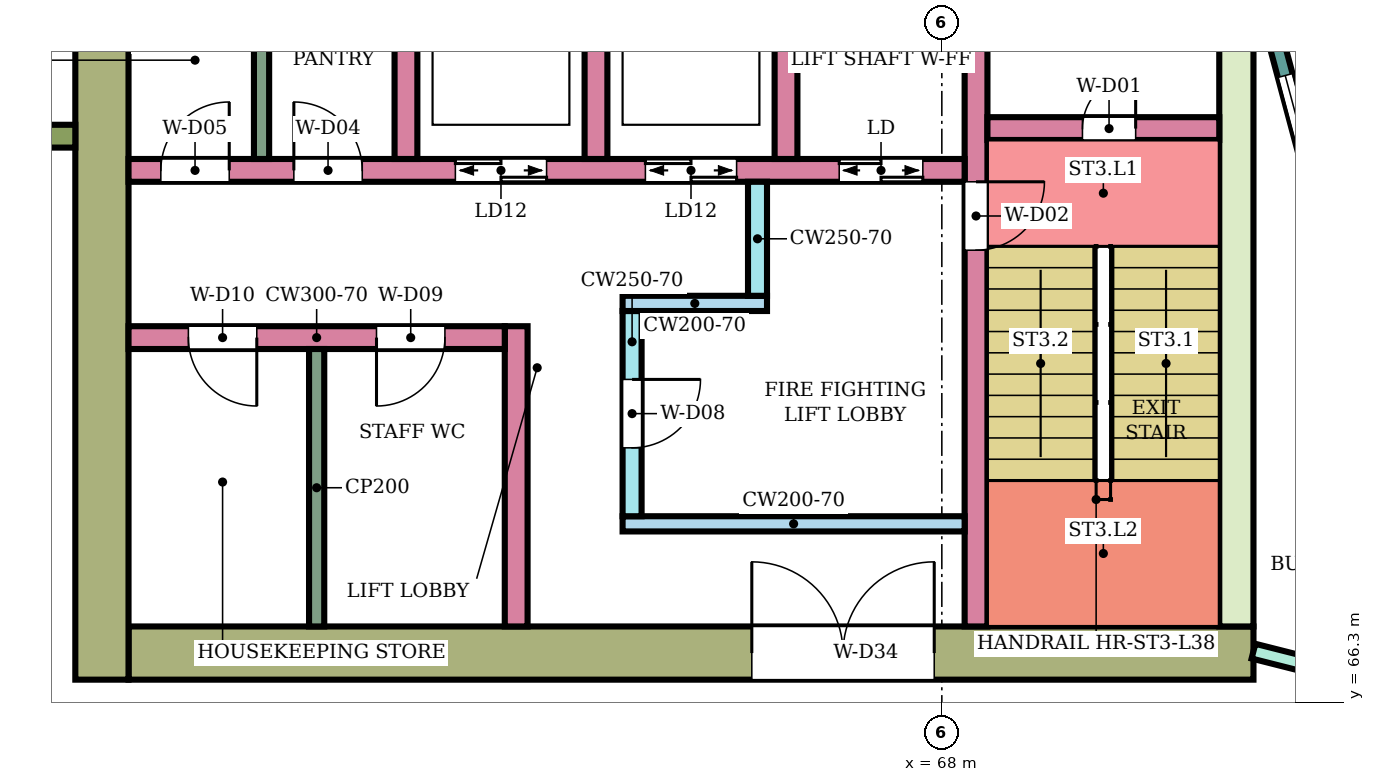
"""IFC4 building model, lengths in metres.
Left out: names, types, materials, properties, quantities, classifications, styles, units other than length and angle.
Written with IfcOpenShell. Run it as: python <this file> out.ifc"""

import sys

from ifc_helpers import new_model, si_unit, direction, frame, frame_2d, origin, place, context, subcontext, project, spatial, rectangle, extrude, element, fill, save


model = new_model("IFC4")
c1 = context("Model", 3, precision=1e-05, world=origin(), true_north=direction((0.0, 1.0)))
c2 = subcontext(c1, "Body", "Model", "MODEL_VIEW")
j1 = project(units=[si_unit("LENGTHUNIT", "METRE"), si_unit("PLANEANGLEUNIT", "RADIAN")], contexts=[c1])
p1 = place(None, origin())
s1 = spatial("IfcSite", under=j1, at=p1, CompositionType="ELEMENT")
p2 = place(p1, origin())
s2 = spatial("IfcBuilding", under=s1, at=p2, CompositionType="ELEMENT")
p3 = place(p2, frame((0.0, 0.0, 165.9)))
s3 = spatial("IfcBuildingStorey", under=s2, at=p3, CompositionType="ELEMENT", Elevation=165.9)
p4 = place(p3, frame((72.1, 66.95, 0.0), z_axis=(0.0, 0.0, 1.0), x_axis=(-1.0, 0.0, 0.0)))
e1 = element("IfcWall", 1, at=p4, inside=s3, PredefinedType="SHEAR", context=c2, shape_type="SweptSolid", body=[
    extrude(rectangle(XDim=14.8, YDim=0.7, at=frame_2d((7.4, 0.0))), origin(), (0.0, 0.0, 1.0), 3.78),
])
p5 = place(p4, frame((4.2, 0.0, 0.0)))
e2 = element("IfcOpeningElement", 2, at=p5, cuts=e1, PredefinedType="OPENING", context=c2, shape_type="SweptSolid", body=[
    extrude(rectangle(XDim=2.4, YDim=2.4, at=frame_2d((1.2, 1.2))), frame((0.0, 0.36, 0.0), z_axis=(0.0, -1.0, 0.0), x_axis=(1.0, 0.0, 0.0)), (0.0, 0.0, 1.0), 0.72),
])
p6 = place(p3, frame((71.875, 75.0, 0.0), z_axis=(0.0, 0.0, 1.0), x_axis=(0.0, -1.0, 0.0)))
e3 = element("IfcWall", 3, at=p6, inside=s3, PredefinedType="SHEAR", context=c2, shape_type="SweptSolid", body=[
    extrude(rectangle(XDim=7.7, YDim=0.45, at=frame_2d((3.85, 0.0))), origin(), (0.0, 0.0, 1.0), 3.78),
])
p7 = place(p3, frame((56.95, 83.4, 0.0), z_axis=(0.0, 0.0, 1.0), x_axis=(0.0, -1.0, 0.0)))
e4 = element("IfcWall", 4, at=p7, inside=s3, PredefinedType="SHEAR", context=c2, shape_type="SweptSolid", body=[
    extrude(rectangle(XDim=16.8, YDim=0.7, at=frame_2d((8.4, 0.0))), origin(), (0.0, 0.0, 1.0), 3.78),
])
p8 = place(p3, frame((68.45, 75.0, 0.0), z_axis=(0.0, 0.0, 1.0), x_axis=(0.0, -1.0, 0.0)))
e5 = element("IfcWall", 5, at=p8, inside=s3, PredefinedType="SHEAR", context=c2, shape_type="SweptSolid", body=[
    extrude(rectangle(XDim=7.7, YDim=0.3, at=frame_2d((3.85, 0.0))), origin(), (0.0, 0.0, 1.0), 3.78),
])
p9 = place(p8, frame((1.85, 0.0, 0.0)))
e6 = element("IfcOpeningElement", 6, at=p9, cuts=e5, PredefinedType="OPENING", context=c2, shape_type="SweptSolid", body=[
    extrude(rectangle(XDim=0.9, YDim=2.1, at=frame_2d((0.45, 1.05))), frame((0.0, 0.16, 0.0), z_axis=(0.0, -1.0, 0.0), x_axis=(1.0, 0.0, 0.0)), (0.0, 0.0, 1.0), 0.32),
])
p10 = place(p3, frame((71.65, 73.85, 0.0), z_axis=(0.0, 0.0, 1.0), x_axis=(-1.0, 0.0, 0.0)))
e7 = element("IfcWall", 7, at=p10, inside=s3, PredefinedType="SHEAR", context=c2, shape_type="SweptSolid", body=[
    extrude(rectangle(XDim=3.05, YDim=0.3, at=frame_2d((1.525, 0.0))), origin(), (0.0, 0.0, 1.0), 3.78),
])
p11 = place(p10, frame((1.1, 0.0, 0.0)))
e8 = element("IfcOpeningElement", 8, at=p11, cuts=e7, PredefinedType="OPENING", context=c2, shape_type="SweptSolid", body=[
    extrude(rectangle(XDim=0.7, YDim=2.0, at=frame_2d((0.35, 1.0))), frame((0.0, 0.16, 0.0), z_axis=(0.0, -1.0, 0.0), x_axis=(1.0, 0.0, 0.0)), (0.0, 0.0, 1.0), 0.32),
])
p12 = place(p3, frame((68.3, 73.3, 0.0), z_axis=(0.0, 0.0, 1.0), x_axis=(-1.0, 0.0, 0.0)))
e9 = element("IfcWall", 9, at=p12, inside=s3, PredefinedType="SHEAR", context=c2, shape_type="SweptSolid", body=[
    extrude(rectangle(XDim=11.0, YDim=0.3, at=frame_2d((5.5, 0.0))), origin(), (0.0, 0.0, 1.0), 3.78),
])
p13 = place(p12, frame((0.55, 0.0, 0.0)))
e10 = element("IfcOpeningElement", 10, at=p13, cuts=e9, PredefinedType="OPENING", context=c2, shape_type="SweptSolid", body=[
    extrude(rectangle(XDim=1.1, YDim=2.1, at=frame_2d((0.55, 1.05))), frame((0.0, 0.16, 0.0), z_axis=(0.0, -1.0, 0.0), x_axis=(1.0, 0.0, 0.0)), (0.0, 0.0, 1.0), 0.32),
])
p14 = place(p12, frame((3.0, 0.0, 0.0)))
e11 = element("IfcOpeningElement", 11, at=p14, cuts=e9, PredefinedType="OPENING", context=c2, shape_type="SweptSolid", body=[
    extrude(rectangle(XDim=1.2, YDim=2.1, at=frame_2d((0.6, 1.05))), frame((0.0, 0.16, 0.0), z_axis=(0.0, -1.0, 0.0), x_axis=(1.0, 0.0, 0.0)), (0.0, 0.0, 1.0), 0.32),
])
p15 = place(p12, frame((5.5, 0.0, 0.0)))
e12 = element("IfcOpeningElement", 12, at=p15, cuts=e9, PredefinedType="OPENING", context=c2, shape_type="SweptSolid", body=[
    extrude(rectangle(XDim=1.2, YDim=2.1, at=frame_2d((0.6, 1.05))), frame((0.0, 0.16, 0.0), z_axis=(0.0, -1.0, 0.0), x_axis=(1.0, 0.0, 0.0)), (0.0, 0.0, 1.0), 0.32),
])
p16 = place(p12, frame((7.925, 0.0, 0.0)))
e13 = element("IfcOpeningElement", 13, at=p16, cuts=e9, PredefinedType="OPENING", context=c2, shape_type="SweptSolid", body=[
    extrude(rectangle(XDim=0.9, YDim=2.1, at=frame_2d((0.45, 1.05))), frame((0.0, 0.16, 0.0), z_axis=(0.0, -1.0, 0.0), x_axis=(1.0, 0.0, 0.0)), (0.0, 0.0, 1.0), 0.32),
])
p17 = place(p12, frame((9.675, 0.0, 0.0)))
e14 = element("IfcOpeningElement", 14, at=p17, cuts=e9, PredefinedType="OPENING", context=c2, shape_type="SweptSolid", body=[
    extrude(rectangle(XDim=0.9, YDim=2.1, at=frame_2d((0.45, 1.05))), frame((0.0, 0.16, 0.0), z_axis=(0.0, -1.0, 0.0), x_axis=(1.0, 0.0, 0.0)), (0.0, 0.0, 1.0), 0.32),
])
for number, where, z_axis, x_axis in (
    (15, (65.95, 76.0, 0.0), (0.0, 0.0, 1.0), (0.0, -1.0, 0.0)),
    (16, (63.45, 76.0, 0.0), (0.0, 0.0, 1.0), (0.0, -1.0, 0.0)),
    (17, (60.95, 76.0, 0.0), (0.0, 0.0, 1.0), (0.0, -1.0, 0.0)),
):
    element("IfcWall", number, at=place(p3, frame(where, z_axis=z_axis, x_axis=x_axis)), inside=s3, PredefinedType="SHEAR", context=c2, shape_type="SweptSolid", body=[
        extrude(rectangle(XDim=2.55, YDim=0.3, at=frame_2d((1.275, 0.0))), origin(), (0.0, 0.0, 1.0), 3.78),
    ])
p18 = place(p3, frame((68.3, 68.65, 0.0), z_axis=(0.0, 0.0, 1.0), x_axis=(-1.0, 0.0, 0.0)))
e18 = element("IfcWall", 18, at=p18, inside=s3, PredefinedType="SHEAR", context=c2, shape_type="SweptSolid", body=[
    extrude(rectangle(XDim=4.5, YDim=0.2, at=frame_2d((2.25, 0.0))), origin(), (0.0, 0.0, 1.0), 3.78),
])
p19 = place(p3, frame((63.925, 71.45, 0.0), z_axis=(0.0, 0.0, 1.0), x_axis=(0.0, -1.0, 0.0)))
e19 = element("IfcWall", 19, at=p19, inside=s3, PredefinedType="SHEAR", context=c2, shape_type="SweptSolid", body=[
    extrude(rectangle(XDim=2.7, YDim=0.25, at=frame_2d((1.35, 0.0))), origin(), (0.0, 0.0, 1.0), 3.78),
])
p20 = place(p19, frame((0.9, 0.0, 0.0)))
e20 = element("IfcOpeningElement", 20, at=p20, cuts=e19, PredefinedType="OPENING", context=c2, shape_type="SweptSolid", body=[
    extrude(rectangle(XDim=0.9, YDim=2.1, at=frame_2d((0.45, 1.05))), frame((0.0, 0.135, 0.0), z_axis=(0.0, -1.0, 0.0), x_axis=(1.0, 0.0, 0.0)), (0.0, 0.0, 1.0), 0.27),
])
p21 = place(p3, frame((65.7, 71.55, 0.0), z_axis=(0.0, 0.0, 1.0), x_axis=(-1.0, 0.0, 0.0)))
e21 = element("IfcWall", 21, at=p21, inside=s3, PredefinedType="SHEAR", context=c2, shape_type="SweptSolid", body=[
    extrude(rectangle(XDim=1.9, YDim=0.2, at=frame_2d((0.95, 0.0))), origin(), (0.0, 0.0, 1.0), 3.78),
])
p22 = place(p3, frame((65.575, 73.15, 0.0), z_axis=(0.0, 0.0, 1.0), x_axis=(0.0, -1.0, 0.0)))
e22 = element("IfcWall", 22, at=p22, inside=s3, PredefinedType="SHEAR", context=c2, shape_type="SweptSolid", body=[
    extrude(rectangle(XDim=1.5, YDim=0.25, at=frame_2d((0.75, 0.0))), origin(), (0.0, 0.0, 1.0), 3.78),
])
p23 = place(p3, frame((62.4, 71.25, 0.0), z_axis=(0.0, 0.0, 1.0), x_axis=(0.0, -1.0, 0.0)))
e23 = element("IfcWall", 23, at=p23, inside=s3, PredefinedType="SHEAR", context=c2, shape_type="SweptSolid", body=[
    extrude(rectangle(XDim=3.95, YDim=0.3, at=frame_2d((1.975, 0.0))), origin(), (0.0, 0.0, 1.0), 3.78),
])
p24 = place(p3, frame((62.25, 71.1, 0.0), z_axis=(0.0, 0.0, 1.0), x_axis=(-1.0, 0.0, 0.0)))
e24 = element("IfcWall", 24, at=p24, inside=s3, PredefinedType="SHEAR", context=c2, shape_type="SweptSolid", body=[
    extrude(rectangle(XDim=4.95, YDim=0.3, at=frame_2d((2.475, 0.0))), origin(), (0.0, 0.0, 1.0), 3.78),
])
p25 = place(p24, frame((0.788, 0.0, 0.0)))
e25 = element("IfcOpeningElement", 25, at=p25, cuts=e24, PredefinedType="OPENING", context=c2, shape_type="SweptSolid", body=[
    extrude(rectangle(XDim=0.9, YDim=2.1, at=frame_2d((0.45, 1.05))), frame((0.0, 0.16, 0.0), z_axis=(0.0, -1.0, 0.0), x_axis=(1.0, 0.0, 0.0)), (0.0, 0.0, 1.0), 0.32),
])
p26 = place(p24, frame((3.262, 0.0, 0.0)))
e26 = element("IfcOpeningElement", 26, at=p26, cuts=e24, PredefinedType="OPENING", context=c2, shape_type="SweptSolid", body=[
    extrude(rectangle(XDim=0.9, YDim=2.1, at=frame_2d((0.45, 1.05))), frame((0.0, 0.16, 0.0), z_axis=(0.0, -1.0, 0.0), x_axis=(1.0, 0.0, 0.0)), (0.0, 0.0, 1.0), 0.32),
])
p27 = place(p3, frame((56.6, 73.75, 0.0), z_axis=(0.0, 0.0, 1.0), x_axis=(-1.0, 0.0, 0.0)))
e27 = element("IfcWall", 27, at=p27, inside=s3, PredefinedType="NOTDEFINED", context=c2, shape_type="SweptSolid", body=[
    extrude(rectangle(XDim=2.416, YDim=0.3, at=frame_2d((1.208, 0.0))), origin(), (0.0, 0.0, 1.0), 4.1),
])
p28 = place(p3, frame((72.396, 75.0, 0.0), z_axis=(0.0, 0.0, 1.0), x_axis=(0.258789828301, -0.965933654434, 0.0)))
e28 = element("IfcWall", 28, at=p28, inside=s3, PredefinedType="NOTDEFINED", context=c2, shape_type="SweptSolid", body=[
    extrude(rectangle(XDim=3.936, YDim=0.2, at=frame_2d((1.968, 0.0))), origin(), (0.0, 0.0, 1.0), 4.1),
])
p29 = place(p28, frame((0.468, 0.0, 0.9)))
e29 = element("IfcOpeningElement", 29, at=p29, cuts=e28, PredefinedType="OPENING", context=c2, shape_type="SweptSolid", body=[
    extrude(rectangle(XDim=3.0, YDim=2.3, at=frame_2d((1.5, 1.15))), frame((0.0, 0.11, 0.0), z_axis=(0.0, -1.0, 0.0), x_axis=(1.0, 0.0, 0.0)), (0.0, 0.0, 1.0), 0.22),
])
p30 = place(p3, frame((72.1, 66.975, 0.0), z_axis=(0.0, 0.0, 1.0), x_axis=(0.969471314457, -0.245204752086, 0.0)))
e30 = element("IfcWall", 30, at=p30, inside=s3, PredefinedType="PARTITIONING", context=c2, shape_type="SweptSolid", body=[
    extrude(rectangle(XDim=2.582, YDim=0.2, at=frame_2d((1.291, 0.0))), origin(), (0.0, 0.0, 1.0), 3.65),
])
p31 = place(p30, frame((0.841, 0.0, 0.0)))
e31 = element("IfcOpeningElement", 31, at=p31, cuts=e30, PredefinedType="OPENING", context=c2, shape_type="SweptSolid", body=[
    extrude(rectangle(XDim=0.9, YDim=2.1, at=frame_2d((0.45, 1.05))), frame((0.0, 0.11, 0.0), z_axis=(0.0, -1.0, 0.0), x_axis=(1.0, 0.0, 0.0)), (0.0, 0.0, 1.0), 0.22),
])
p32 = place(p3, frame((59.05, 76.0, 0.0), z_axis=(0.0, 0.0, 1.0), x_axis=(0.0, -1.0, 0.0)))
e32 = element("IfcWall", 32, at=p32, inside=s3, PredefinedType="PARTITIONING", context=c2, shape_type="SweptSolid", body=[
    extrude(rectangle(XDim=2.55, YDim=0.2, at=frame_2d((1.275, 0.0))), origin(), (0.0, 0.0, 1.0), 3.78),
])
p33 = place(p3, frame((59.775, 70.95, 0.0), z_axis=(0.0, 0.0, 1.0), x_axis=(0.0, -1.0, 0.0)))
e33 = element("IfcWall", 33, at=p33, inside=s3, PredefinedType="PARTITIONING", context=c2, shape_type="SweptSolid", body=[
    extrude(rectangle(XDim=3.65, YDim=0.2, at=frame_2d((1.825, 0.0))), origin(), (0.0, 0.0, 1.0), 3.78),
])
p34 = place(p29, origin())
e34 = element("IfcWindow", 34, at=p34, inside=s3, PartitioningType="SINGLE_PANEL", PredefinedType="WINDOW", context=c2, shape_type="SweptSolid", body=[
    extrude(rectangle(XDim=3.0, YDim=2.3, at=frame_2d((1.5, 1.15))), frame((0.0, 0.03, 0.0), z_axis=(0.0, -1.0, 0.0), x_axis=(1.0, 0.0, 0.0)), (0.0, 0.0, 1.0), 0.06),
])
fill(e29, e34)
p35 = place(p11, frame((0.7, 0.0, 0.0), z_axis=(0.0, 0.0, 1.0), x_axis=(-1.0, 0.0, 0.0)))
e35 = element("IfcDoor", 35, at=p35, inside=s3, OperationType="SINGLE_SWING_RIGHT", PredefinedType="DOOR", context=c2, shape_type="SweptSolid", body=[
    extrude(rectangle(XDim=0.7, YDim=2.0, at=frame_2d((0.35, 1.0))), frame((0.0, 0.025, 0.0), z_axis=(0.0, -1.0, 0.0), x_axis=(1.0, 0.0, 0.0)), (0.0, 0.0, 1.0), 0.05),
])
fill(e8, e35)
p36 = place(p9, origin())
e36 = element("IfcDoor", 36, at=p36, inside=s3, OperationType="SINGLE_SWING_LEFT", PredefinedType="DOOR", context=c2, shape_type="SweptSolid", body=[
    extrude(rectangle(XDim=0.9, YDim=2.1, at=frame_2d((0.45, 1.05))), frame((0.0, 0.025, 0.0), z_axis=(0.0, -1.0, 0.0), x_axis=(1.0, 0.0, 0.0)), (0.0, 0.0, 1.0), 0.05),
])
fill(e6, e36)
p37 = place(p13, origin())
e37 = element("IfcDoor", 37, at=p37, inside=s3, OperationType="DOUBLE_DOOR_SLIDING", PredefinedType="DOOR", context=c2, shape_type="SweptSolid", body=[
    extrude(rectangle(XDim=1.1, YDim=2.1, at=frame_2d((0.55, 1.05))), frame((0.0, 0.025, 0.0), z_axis=(0.0, -1.0, 0.0), x_axis=(1.0, 0.0, 0.0)), (0.0, 0.0, 1.0), 0.05),
])
fill(e10, e37)
p38 = place(p14, origin())
e38 = element("IfcDoor", 38, at=p38, inside=s3, OperationType="DOUBLE_DOOR_SLIDING", PredefinedType="DOOR", context=c2, shape_type="SweptSolid", body=[
    extrude(rectangle(XDim=1.2, YDim=2.1, at=frame_2d((0.6, 1.05))), frame((0.0, 0.025, 0.0), z_axis=(0.0, -1.0, 0.0), x_axis=(1.0, 0.0, 0.0)), (0.0, 0.0, 1.0), 0.05),
])
fill(e11, e38)
p39 = place(p15, origin())
e39 = element("IfcDoor", 39, at=p39, inside=s3, OperationType="DOUBLE_DOOR_SLIDING", PredefinedType="DOOR", context=c2, shape_type="SweptSolid", body=[
    extrude(rectangle(XDim=1.2, YDim=2.1, at=frame_2d((0.6, 1.05))), frame((0.0, 0.025, 0.0), z_axis=(0.0, -1.0, 0.0), x_axis=(1.0, 0.0, 0.0)), (0.0, 0.0, 1.0), 0.05),
])
fill(e12, e39)
p40 = place(p16, frame((0.9, 0.0, 0.0), z_axis=(0.0, 0.0, 1.0), x_axis=(-1.0, 0.0, 0.0)))
e40 = element("IfcDoor", 40, at=p40, inside=s3, OperationType="SINGLE_SWING_LEFT", PredefinedType="DOOR", context=c2, shape_type="SweptSolid", body=[
    extrude(rectangle(XDim=0.9, YDim=2.1, at=frame_2d((0.45, 1.05))), frame((0.0, 0.025, 0.0), z_axis=(0.0, -1.0, 0.0), x_axis=(1.0, 0.0, 0.0)), (0.0, 0.0, 1.0), 0.05),
])
fill(e13, e40)
p41 = place(p17, frame((0.9, 0.0, 0.0), z_axis=(0.0, 0.0, 1.0), x_axis=(-1.0, 0.0, 0.0)))
e41 = element("IfcDoor", 41, at=p41, inside=s3, OperationType="SINGLE_SWING_RIGHT", PredefinedType="DOOR", context=c2, shape_type="SweptSolid", body=[
    extrude(rectangle(XDim=0.9, YDim=2.1, at=frame_2d((0.45, 1.05))), frame((0.0, 0.025, 0.0), z_axis=(0.0, -1.0, 0.0), x_axis=(1.0, 0.0, 0.0)), (0.0, 0.0, 1.0), 0.05),
])
fill(e14, e41)
p42 = place(p20, origin())
e42 = element("IfcDoor", 42, at=p42, inside=s3, OperationType="SINGLE_SWING_LEFT", PredefinedType="DOOR", context=c2, shape_type="SweptSolid", body=[
    extrude(rectangle(XDim=0.9, YDim=2.1, at=frame_2d((0.45, 1.05))), frame((0.0, 0.025, 0.0), z_axis=(0.0, -1.0, 0.0), x_axis=(1.0, 0.0, 0.0)), (0.0, 0.0, 1.0), 0.05),
])
fill(e20, e42)
p43 = place(p25, origin())
e43 = element("IfcDoor", 43, at=p43, inside=s3, OperationType="SINGLE_SWING_RIGHT", PredefinedType="DOOR", context=c2, shape_type="SweptSolid", body=[
    extrude(rectangle(XDim=0.9, YDim=2.1, at=frame_2d((0.45, 1.05))), frame((0.0, 0.025, 0.0), z_axis=(0.0, -1.0, 0.0), x_axis=(1.0, 0.0, 0.0)), (0.0, 0.0, 1.0), 0.05),
])
fill(e25, e43)
p44 = place(p26, origin())
e44 = element("IfcDoor", 44, at=p44, inside=s3, OperationType="SINGLE_SWING_LEFT", PredefinedType="DOOR", context=c2, shape_type="SweptSolid", body=[
    extrude(rectangle(XDim=0.9, YDim=2.1, at=frame_2d((0.45, 1.05))), frame((0.0, 0.025, 0.0), z_axis=(0.0, -1.0, 0.0), x_axis=(1.0, 0.0, 0.0)), (0.0, 0.0, 1.0), 0.05),
])
fill(e26, e44)
p45 = place(p5, frame((2.4, 0.0, 0.0), z_axis=(0.0, 0.0, 1.0), x_axis=(-1.0, 0.0, 0.0)))
e45 = element("IfcDoor", 45, at=p45, inside=s3, OperationType="DOUBLE_DOOR_SINGLE_SWING", PredefinedType="DOOR", context=c2, shape_type="SweptSolid", body=[
    extrude(rectangle(XDim=2.4, YDim=2.4, at=frame_2d((1.2, 1.2))), frame((0.0, 0.025, 0.0), z_axis=(0.0, -1.0, 0.0), x_axis=(1.0, 0.0, 0.0)), (0.0, 0.0, 1.0), 0.05),
])
fill(e2, e45)
save(model, sys.argv[1])
